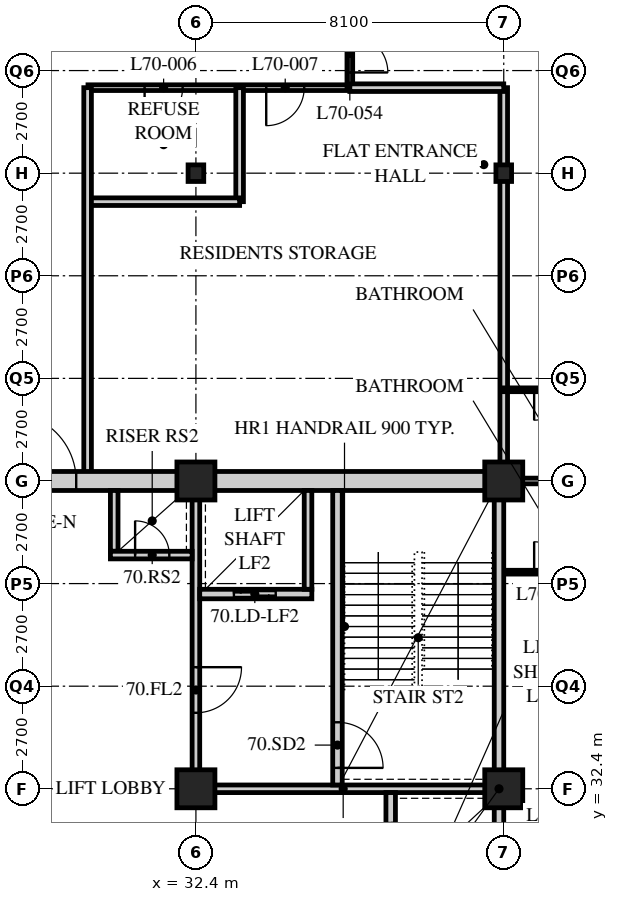
"""IFC4 building model, lengths in metres.
Left out: names, types, materials, properties, quantities, classifications, styles, units other than length and angle.
Written with IfcOpenShell. Run it as: python <this file> out.ifc"""

import sys

from ifc_helpers import new_model, si_unit, direction, frame, frame_2d, origin, origin_2d, place, context, subcontext, project, spatial, rectangle, hollow_rectangle, i_section, extrude, element, fill, save


model = new_model("IFC4")
c1 = context("Model", 3, precision=1e-05, world=origin(), true_north=direction((0.0, 1.0)))
c2 = subcontext(c1, "Body", "Model", "MODEL_VIEW")
j1 = project(units=[si_unit("LENGTHUNIT", "METRE"), si_unit("PLANEANGLEUNIT", "RADIAN")], contexts=[c1])
p1 = place(None, origin())
s1 = spatial("IfcSite", under=j1, at=p1, CompositionType="ELEMENT")
p2 = place(p1, origin())
s2 = spatial("IfcBuilding", under=s1, at=p2, CompositionType="ELEMENT")
p3 = place(p2, frame((0.0, 0.0, 273.6)))
s3 = spatial("IfcBuildingStorey", under=s2, at=p3, CompositionType="ELEMENT", Elevation=273.6)
for number, where, z_axis, x_axis in (
    (1, (32.4, 32.4, 0.0), (0.0, 0.0, 1.0), (1.0, 0.0, 0.0)),
    (2, (32.4, 40.5, 0.0), (0.0, 0.0, 1.0), (1.0, 0.0, 0.0)),
):
    element("IfcColumn", number, at=place(p3, frame(where, z_axis=z_axis, x_axis=x_axis)), inside=s3, PredefinedType="COLUMN", context=c2, shape_type="SweptSolid", body=[
        extrude(hollow_rectangle(XDim=1.0, YDim=1.0, WallThickness=0.1, at=origin_2d()), origin(), (0.0, 0.0, 1.0), 3.9),
    ])
p4 = place(p3, frame((32.4, 48.6, 0.0), z_axis=(0.0, 0.0, 1.0), x_axis=(1.0, 0.0, 0.0)))
e3 = element("IfcColumn", 3, at=p4, inside=s3, PredefinedType="COLUMN", context=c2, shape_type="SweptSolid", body=[
    extrude(i_section(OverallWidth=0.412, OverallDepth=0.437, WebThickness=0.036, FlangeThickness=0.058, FilletRadius=0.015, at=origin_2d()), origin(), (0.0, 0.0, 1.0), 3.9),
])
for number, where, z_axis, x_axis in (
    (4, (40.5, 32.4, 0.0), (0.0, 0.0, 1.0), (1.0, 0.0, 0.0)),
    (5, (40.5, 40.5, 0.0), (0.0, 0.0, 1.0), (1.0, 0.0, 0.0)),
):
    element("IfcColumn", number, at=place(p3, frame(where, z_axis=z_axis, x_axis=x_axis)), inside=s3, PredefinedType="COLUMN", context=c2, shape_type="SweptSolid", body=[
        extrude(hollow_rectangle(XDim=1.0, YDim=1.0, WallThickness=0.1, at=origin_2d()), origin(), (0.0, 0.0, 1.0), 3.9),
    ])
p5 = place(p3, frame((40.5, 48.6, 0.0), z_axis=(0.0, 0.0, 1.0), x_axis=(1.0, 0.0, 0.0)))
e6 = element("IfcColumn", 6, at=p5, inside=s3, PredefinedType="COLUMN", context=c2, shape_type="SweptSolid", body=[
    extrude(i_section(OverallWidth=0.412, OverallDepth=0.437, WebThickness=0.036, FlangeThickness=0.058, FilletRadius=0.015, at=origin_2d()), origin(), (0.0, 0.0, 1.0), 3.9),
])
p6 = place(p3, frame((29.56, 50.85, 0.0), z_axis=(0.0, 0.0, 1.0), x_axis=(1.0, 0.0, 0.0)))
e7 = element("IfcWall", 7, at=p6, inside=s3, PredefinedType="PARTITIONING", context=c2, shape_type="SweptSolid", body=[
    extrude(rectangle(XDim=6.89, YDim=0.15, at=frame_2d((3.445, 0.0))), origin(), (0.0, 0.0, 1.0), 3.69),
])
p7 = place(p6, frame((1.49, 0.0, 0.0)))
e8 = element("IfcOpeningElement", 8, at=p7, cuts=e7, PredefinedType="OPENING", context=c2, shape_type="SweptSolid", body=[
    extrude(rectangle(XDim=1.0, YDim=2.1, at=frame_2d((0.5, 1.05))), frame((0.0, 0.085, 0.0), z_axis=(0.0, -1.0, 0.0), x_axis=(1.0, 0.0, 0.0)), (0.0, 0.0, 1.0), 0.17),
])
p8 = place(p6, frame((4.69, 0.0, 0.0)))
e9 = element("IfcOpeningElement", 9, at=p8, cuts=e7, PredefinedType="OPENING", context=c2, shape_type="SweptSolid", body=[
    extrude(rectangle(XDim=1.0, YDim=2.1, at=frame_2d((0.5, 1.05))), frame((0.0, 0.085, 0.0), z_axis=(0.0, -1.0, 0.0), x_axis=(1.0, 0.0, 0.0)), (0.0, 0.0, 1.0), 0.17),
])
p9 = place(p3, frame((33.55, 50.85, 0.0), z_axis=(0.0, 0.0, 1.0), x_axis=(0.0, -1.0, 0.0)))
e10 = element("IfcWall", 10, at=p9, inside=s3, PredefinedType="SOLIDWALL", context=c2, shape_type="SweptSolid", body=[
    extrude(rectangle(XDim=3.0, YDim=0.2, at=frame_2d((1.5, 0.0))), origin(), (0.0, 0.0, 1.0), 3.69),
])
p10 = place(p3, frame((29.55, 47.85, 0.0), z_axis=(0.0, 0.0, 1.0), x_axis=(1.0, 0.0, 0.0)))
e11 = element("IfcWall", 11, at=p10, inside=s3, PredefinedType="SOLIDWALL", context=c2, shape_type="SweptSolid", body=[
    extrude(rectangle(XDim=4.0, YDim=0.2, at=frame_2d((2.0, 0.0))), origin(), (0.0, 0.0, 1.0), 3.69),
])
p11 = place(p3, frame((29.55, 40.5, 0.0), z_axis=(0.0, 0.0, 1.0), x_axis=(0.0, 1.0, 0.0)))
e12 = element("IfcWall", 12, at=p11, inside=s3, PredefinedType="SOLIDWALL", context=c2, shape_type="SweptSolid", body=[
    extrude(rectangle(XDim=10.35, YDim=0.2, at=frame_2d((5.175, 0.0))), origin(), (0.0, 0.0, 1.0), 3.69),
])
p12 = place(p3, frame((36.45, 50.85, 0.0), z_axis=(0.0, 0.0, 1.0), x_axis=(0.0, 1.0, 0.0)))
e13 = element("IfcWall", 13, at=p12, inside=s3, PredefinedType="PARTITIONING", context=c2, shape_type="SweptSolid", body=[
    extrude(rectangle(XDim=1.8, YDim=0.15, at=frame_2d((0.9, 0.0))), origin(), (0.0, 0.0, 1.0), 3.69),
])
p13 = place(p12, frame((0.4, 0.0, 0.0)))
e14 = element("IfcOpeningElement", 14, at=p13, cuts=e13, PredefinedType="OPENING", context=c2, shape_type="SweptSolid", body=[
    extrude(rectangle(XDim=1.0, YDim=2.1, at=frame_2d((0.5, 1.05))), frame((0.0, 0.085, 0.0), z_axis=(0.0, -1.0, 0.0), x_axis=(1.0, 0.0, 0.0)), (0.0, 0.0, 1.0), 0.17),
])
p14 = place(p3, frame((40.5, 40.5, 0.0), z_axis=(0.0, 0.0, 1.0), x_axis=(0.0, 1.0, 0.0)))
e15 = element("IfcWall", 15, at=p14, inside=s3, PredefinedType="SOLIDWALL", context=c2, shape_type="SweptSolid", body=[
    extrude(rectangle(XDim=10.35, YDim=0.2, at=frame_2d((5.175, 0.0))), origin(), (0.0, 0.0, 1.0), 3.078),
])
p15 = place(p3, frame((40.5, 38.1, 0.0), z_axis=(0.0, 0.0, 1.0), x_axis=(1.0, 0.0, 0.0)))
e16 = element("IfcWall", 16, at=p15, inside=s3, PredefinedType="PARTITIONING", context=c2, shape_type="SweptSolid", body=[
    extrude(rectangle(XDim=2.4, YDim=0.1, at=frame_2d((1.2, 0.0))), origin(), (0.0, 0.0, 1.0), 3.69),
])
p16 = place(p15, frame((0.8, 0.0, 0.0)))
e17 = element("IfcOpeningElement", 17, at=p16, cuts=e16, PredefinedType="OPENING", context=c2, shape_type="SweptSolid", body=[
    extrude(rectangle(XDim=0.8, YDim=2.1, at=frame_2d((0.4, 1.05))), frame((0.0, 0.06, 0.0), z_axis=(0.0, -1.0, 0.0), x_axis=(1.0, 0.0, 0.0)), (0.0, 0.0, 1.0), 0.12),
])
p17 = place(p3, frame((40.5, 40.5, 0.0), z_axis=(0.0, 0.0, 1.0), x_axis=(1.0, 0.0, 0.0)))
e18 = element("IfcWall", 18, at=p17, inside=s3, PredefinedType="PARTITIONING", context=c2, shape_type="SweptSolid", body=[
    extrude(rectangle(XDim=15.9, YDim=0.15, at=frame_2d((7.95, 0.0))), origin(), (0.0, 0.0, 1.0), 3.078),
])
p18 = place(p3, frame((40.5, 42.9, 0.0), z_axis=(0.0, 0.0, 1.0), x_axis=(1.0, 0.0, 0.0)))
e19 = element("IfcWall", 19, at=p18, inside=s3, PredefinedType="PARTITIONING", context=c2, shape_type="SweptSolid", body=[
    extrude(rectangle(XDim=2.4, YDim=0.1, at=frame_2d((1.2, 0.0))), origin(), (0.0, 0.0, 1.0), 3.69),
])
p19 = place(p18, frame((0.8, 0.0, 0.0)))
e20 = element("IfcOpeningElement", 20, at=p19, cuts=e19, PredefinedType="OPENING", context=c2, shape_type="SweptSolid", body=[
    extrude(rectangle(XDim=0.8, YDim=2.1, at=frame_2d((0.4, 1.05))), frame((0.0, 0.06, 0.0), z_axis=(0.0, -1.0, 0.0), x_axis=(1.0, 0.0, 0.0)), (0.0, 0.0, 1.0), 0.12),
])
p20 = place(p3, frame((36.45, 50.85, 0.0), z_axis=(0.0, 0.0, 1.0), x_axis=(1.0, 0.0, 0.0)))
e21 = element("IfcWall", 21, at=p20, inside=s3, PredefinedType="SOLIDWALL", context=c2, shape_type="SweptSolid", body=[
    extrude(rectangle(XDim=4.05, YDim=0.2, at=frame_2d((2.025, 0.0))), origin(), (0.0, 0.0, 1.0), 3.69),
])
p21 = place(p3, frame((15.95, 40.5, 0.0), z_axis=(0.0, 0.0, 1.0), x_axis=(1.0, 0.0, 0.0)))
e22 = element("IfcWall", 22, at=p21, inside=s3, PredefinedType="SOLIDWALL", context=c2, shape_type="SweptSolid", body=[
    extrude(rectangle(XDim=24.55, YDim=0.5, at=frame_2d((12.275, 0.0))), origin(), (0.0, 0.0, 1.0), 3.04),
])
p22 = place(p21, frame((11.5, 0.0, 0.0)))
e23 = element("IfcOpeningElement", 23, at=p22, cuts=e22, PredefinedType="OPENING", context=c2, shape_type="SweptSolid", body=[
    extrude(rectangle(XDim=1.8, YDim=2.4, at=frame_2d((0.9, 1.2))), frame((0.0, 0.26, 0.0), z_axis=(0.0, -1.0, 0.0), x_axis=(1.0, 0.0, 0.0)), (0.0, 0.0, 1.0), 0.52),
])
p23 = place(p3, frame((40.375, 24.55, 0.0), z_axis=(0.0, 0.0, 1.0), x_axis=(0.0, 1.0, 0.0)))
e24 = element("IfcWall", 24, at=p23, inside=s3, PredefinedType="SOLIDWALL", context=c2, shape_type="SweptSolid", body=[
    extrude(rectangle(XDim=15.7, YDim=0.25, at=frame_2d((7.85, 0.0))), origin(), (0.0, 0.0, 1.0), 3.078),
])
p24 = place(p3, frame((32.3, 32.4, 0.0), z_axis=(0.0, 0.0, 1.0), x_axis=(1.0, 0.0, 0.0)))
e25 = element("IfcWall", 25, at=p24, inside=s3, PredefinedType="SOLIDWALL", context=c2, shape_type="SweptSolid", body=[
    extrude(rectangle(XDim=7.95, YDim=0.2, at=frame_2d((3.975, 0.0))), origin(), (0.0, 0.0, 1.0), 3.078),
])
p25 = place(p3, frame((32.4, 32.5, 0.0), z_axis=(0.0, 0.0, 1.0), x_axis=(0.0, 1.0, 0.0)))
e26 = element("IfcWall", 26, at=p25, inside=s3, PredefinedType="SOLIDWALL", context=c2, shape_type="SweptSolid", body=[
    extrude(rectangle(XDim=7.75, YDim=0.2, at=frame_2d((3.875, 0.0))), origin(), (0.0, 0.0, 1.0), 3.078),
])
p26 = place(p25, frame((1.9, 0.0, 0.0)))
e27 = element("IfcOpeningElement", 27, at=p26, cuts=e26, PredefinedType="OPENING", context=c2, shape_type="SweptSolid", body=[
    extrude(rectangle(XDim=1.2, YDim=2.1, at=frame_2d((0.6, 1.05))), frame((0.0, 0.11, 0.0), z_axis=(0.0, -1.0, 0.0), x_axis=(1.0, 0.0, 0.0)), (0.0, 0.0, 1.0), 0.22),
])
p27 = place(p3, frame((37.525, 24.55, 0.0), z_axis=(0.0, 0.0, 1.0), x_axis=(0.0, 1.0, 0.0)))
e28 = element("IfcWall", 28, at=p27, inside=s3, PredefinedType="SOLIDWALL", context=c2, shape_type="SweptSolid", body=[
    extrude(rectangle(XDim=7.75, YDim=0.25, at=frame_2d((3.875, 0.0))), origin(), (0.0, 0.0, 1.0), 3.69),
])
p28 = place(p27, frame((0.65, 0.0, 0.0)))
e29 = element("IfcOpeningElement", 29, at=p28, cuts=e28, PredefinedType="OPENING", context=c2, shape_type="SweptSolid", body=[
    extrude(rectangle(XDim=1.1, YDim=2.4, at=frame_2d((0.55, 1.2))), frame((0.0, 0.135, 0.0), z_axis=(0.0, -1.0, 0.0), x_axis=(1.0, 0.0, 0.0)), (0.0, 0.0, 1.0), 0.27),
])
p29 = place(p27, frame((3.25, 0.0, 0.0)))
e30 = element("IfcOpeningElement", 30, at=p29, cuts=e28, PredefinedType="OPENING", context=c2, shape_type="SweptSolid", body=[
    extrude(rectangle(XDim=1.1, YDim=2.4, at=frame_2d((0.55, 1.2))), frame((0.0, 0.135, 0.0), z_axis=(0.0, -1.0, 0.0), x_axis=(1.0, 0.0, 0.0)), (0.0, 0.0, 1.0), 0.27),
])
p30 = place(p27, frame((5.85, 0.0, 0.0)))
e31 = element("IfcOpeningElement", 31, at=p30, cuts=e28, PredefinedType="OPENING", context=c2, shape_type="SweptSolid", body=[
    extrude(rectangle(XDim=1.1, YDim=2.4, at=frame_2d((0.55, 1.2))), frame((0.0, 0.135, 0.0), z_axis=(0.0, -1.0, 0.0), x_axis=(1.0, 0.0, 0.0)), (0.0, 0.0, 1.0), 0.27),
])
p31 = place(p3, frame((36.125, 32.5, 0.0), z_axis=(0.0, 0.0, 1.0), x_axis=(0.0, 1.0, 0.0)))
e32 = element("IfcWall", 32, at=p31, inside=s3, PredefinedType="SOLIDWALL", context=c2, shape_type="SweptSolid", body=[
    extrude(rectangle(XDim=7.75, YDim=0.25, at=frame_2d((3.875, 0.0))), origin(), (0.0, 0.0, 1.0), 3.69),
])
p32 = place(p31, frame((0.45, 0.0, 0.0)))
e33 = element("IfcOpeningElement", 33, at=p32, cuts=e32, PredefinedType="OPENING", context=c2, shape_type="SweptSolid", body=[
    extrude(rectangle(XDim=1.2, YDim=2.1, at=frame_2d((0.6, 1.05))), frame((0.0, 0.135, 0.0), z_axis=(0.0, -1.0, 0.0), x_axis=(1.0, 0.0, 0.0)), (0.0, 0.0, 1.0), 0.27),
])
p33 = place(p3, frame((32.5, 37.525, 0.0), z_axis=(0.0, 0.0, 1.0), x_axis=(1.0, 0.0, 0.0)))
e34 = element("IfcWall", 34, at=p33, inside=s3, PredefinedType="SOLIDWALL", context=c2, shape_type="SweptSolid", body=[
    extrude(rectangle(XDim=2.95, YDim=0.25, at=frame_2d((1.475, 0.0))), origin(), (0.0, 0.0, 1.0), 3.69),
])
p34 = place(p33, frame((0.9, 0.0, 0.0)))
e35 = element("IfcOpeningElement", 35, at=p34, cuts=e34, PredefinedType="OPENING", context=c2, shape_type="SweptSolid", body=[
    extrude(rectangle(XDim=1.1, YDim=2.4, at=frame_2d((0.55, 1.2))), frame((0.0, 0.135, 0.0), z_axis=(0.0, -1.0, 0.0), x_axis=(1.0, 0.0, 0.0)), (0.0, 0.0, 1.0), 0.27),
])
p35 = place(p3, frame((35.35, 37.65, 0.0), z_axis=(0.0, 0.0, 1.0), x_axis=(0.0, 1.0, 0.0)))
e36 = element("IfcWall", 36, at=p35, inside=s3, PredefinedType="SOLIDWALL", context=c2, shape_type="SweptSolid", body=[
    extrude(rectangle(XDim=2.6, YDim=0.2, at=frame_2d((1.3, 0.0))), origin(), (0.0, 0.0, 1.0), 3.69),
])
p36 = place(p3, frame((30.25, 38.65, 0.0), z_axis=(0.0, 0.0, 1.0), x_axis=(0.0, 1.0, 0.0)))
e37 = element("IfcWall", 37, at=p36, inside=s3, PredefinedType="SOLIDWALL", context=c2, shape_type="SweptSolid", body=[
    extrude(rectangle(XDim=1.6, YDim=0.2, at=frame_2d((0.8, 0.0))), origin(), (0.0, 0.0, 1.0), 3.69),
])
p37 = place(p3, frame((30.15, 38.55, 0.0), z_axis=(0.0, 0.0, 1.0), x_axis=(1.0, 0.0, 0.0)))
e38 = element("IfcWall", 38, at=p37, inside=s3, PredefinedType="SOLIDWALL", context=c2, shape_type="SweptSolid", body=[
    extrude(rectangle(XDim=2.15, YDim=0.2, at=frame_2d((1.075, 0.0))), origin(), (0.0, 0.0, 1.0), 3.69),
])
p38 = place(p37, frame((0.65, 0.0, 0.0)))
e39 = element("IfcOpeningElement", 39, at=p38, cuts=e38, PredefinedType="OPENING", context=c2, shape_type="SweptSolid", body=[
    extrude(rectangle(XDim=0.9, YDim=2.1, at=frame_2d((0.45, 1.05))), frame((0.0, 0.11, 0.0), z_axis=(0.0, -1.0, 0.0), x_axis=(1.0, 0.0, 0.0)), (0.0, 0.0, 1.0), 0.22),
])
p39 = place(p7, origin())
e40 = element("IfcDoor", 40, at=p39, inside=s3, OperationType="SINGLE_SWING_RIGHT", PredefinedType="DOOR", context=c2, shape_type="SweptSolid", body=[
    extrude(rectangle(XDim=1.0, YDim=2.1, at=frame_2d((0.5, 1.05))), frame((0.0, 0.025, 0.0), z_axis=(0.0, -1.0, 0.0), x_axis=(1.0, 0.0, 0.0)), (0.0, 0.0, 1.0), 0.05),
])
fill(e8, e40)
p40 = place(p8, origin())
e41 = element("IfcDoor", 41, at=p40, inside=s3, OperationType="SINGLE_SWING_RIGHT", PredefinedType="DOOR", context=c2, shape_type="SweptSolid", body=[
    extrude(rectangle(XDim=1.0, YDim=2.1, at=frame_2d((0.5, 1.05))), frame((0.0, 0.025, 0.0), z_axis=(0.0, -1.0, 0.0), x_axis=(1.0, 0.0, 0.0)), (0.0, 0.0, 1.0), 0.05),
])
fill(e9, e41)
p41 = place(p16, origin())
e42 = element("IfcDoor", 42, at=p41, inside=s3, OperationType="SINGLE_SWING_LEFT", PredefinedType="DOOR", context=c2, shape_type="SweptSolid", body=[
    extrude(rectangle(XDim=0.8, YDim=2.1, at=frame_2d((0.4, 1.05))), frame((0.0, 0.025, 0.0), z_axis=(0.0, -1.0, 0.0), x_axis=(1.0, 0.0, 0.0)), (0.0, 0.0, 1.0), 0.05),
])
fill(e17, e42)
p42 = place(p13, origin())
e43 = element("IfcDoor", 43, at=p42, inside=s3, OperationType="SINGLE_SWING_RIGHT", PredefinedType="DOOR", context=c2, shape_type="SweptSolid", body=[
    extrude(rectangle(XDim=1.0, YDim=2.1, at=frame_2d((0.5, 1.05))), frame((0.0, 0.025, 0.0), z_axis=(0.0, -1.0, 0.0), x_axis=(1.0, 0.0, 0.0)), (0.0, 0.0, 1.0), 0.05),
])
fill(e14, e43)
p43 = place(p19, origin())
e44 = element("IfcDoor", 44, at=p43, inside=s3, OperationType="SINGLE_SWING_RIGHT", PredefinedType="DOOR", context=c2, shape_type="SweptSolid", body=[
    extrude(rectangle(XDim=0.8, YDim=2.1, at=frame_2d((0.4, 1.05))), frame((0.0, 0.025, 0.0), z_axis=(0.0, -1.0, 0.0), x_axis=(1.0, 0.0, 0.0)), (0.0, 0.0, 1.0), 0.05),
])
fill(e20, e44)
p44 = place(p32, origin())
e45 = element("IfcDoor", 45, at=p44, inside=s3, OperationType="SINGLE_SWING_RIGHT", PredefinedType="DOOR", context=c2, shape_type="SweptSolid", body=[
    extrude(rectangle(XDim=1.2, YDim=2.1, at=frame_2d((0.6, 1.05))), frame((0.0, 0.025, 0.0), z_axis=(0.0, -1.0, 0.0), x_axis=(1.0, 0.0, 0.0)), (0.0, 0.0, 1.0), 0.05),
])
fill(e33, e45)
p45 = place(p26, origin())
e46 = element("IfcDoor", 46, at=p45, inside=s3, OperationType="SINGLE_SWING_LEFT", PredefinedType="DOOR", context=c2, shape_type="SweptSolid", body=[
    extrude(rectangle(XDim=1.2, YDim=2.1, at=frame_2d((0.6, 1.05))), frame((0.0, 0.025, 0.0), z_axis=(0.0, -1.0, 0.0), x_axis=(1.0, 0.0, 0.0)), (0.0, 0.0, 1.0), 0.05),
])
fill(e27, e46)
p46 = place(p38, origin())
e47 = element("IfcDoor", 47, at=p46, inside=s3, OperationType="SINGLE_SWING_LEFT", PredefinedType="DOOR", context=c2, shape_type="SweptSolid", body=[
    extrude(rectangle(XDim=0.9, YDim=2.1, at=frame_2d((0.45, 1.05))), frame((0.0, 0.025, 0.0), z_axis=(0.0, -1.0, 0.0), x_axis=(1.0, 0.0, 0.0)), (0.0, 0.0, 1.0), 0.05),
])
fill(e39, e47)
p47 = place(p30, origin())
e48 = element("IfcDoor", 48, at=p47, inside=s3, OperationType="DOUBLE_DOOR_SLIDING", PredefinedType="DOOR", context=c2, shape_type="SweptSolid", body=[
    extrude(rectangle(XDim=1.1, YDim=2.4, at=frame_2d((0.55, 1.2))), frame((0.0, 0.025, 0.0), z_axis=(0.0, -1.0, 0.0), x_axis=(1.0, 0.0, 0.0)), (0.0, 0.0, 1.0), 0.05),
])
fill(e31, e48)
p48 = place(p34, origin())
e49 = element("IfcDoor", 49, at=p48, inside=s3, OperationType="DOUBLE_DOOR_SLIDING", PredefinedType="DOOR", context=c2, shape_type="SweptSolid", body=[
    extrude(rectangle(XDim=1.1, YDim=2.4, at=frame_2d((0.55, 1.2))), frame((0.0, 0.025, 0.0), z_axis=(0.0, -1.0, 0.0), x_axis=(1.0, 0.0, 0.0)), (0.0, 0.0, 1.0), 0.05),
])
fill(e35, e49)
p49 = place(p22, origin())
e50 = element("IfcDoor", 50, at=p49, inside=s3, OperationType="DOUBLE_DOOR_SINGLE_SWING", PredefinedType="DOOR", context=c2, shape_type="SweptSolid", body=[
    extrude(rectangle(XDim=1.8, YDim=2.4, at=frame_2d((0.9, 1.2))), frame((0.0, 0.025, 0.0), z_axis=(0.0, -1.0, 0.0), x_axis=(1.0, 0.0, 0.0)), (0.0, 0.0, 1.0), 0.05),
])
fill(e23, e50)
save(model, sys.argv[1])
